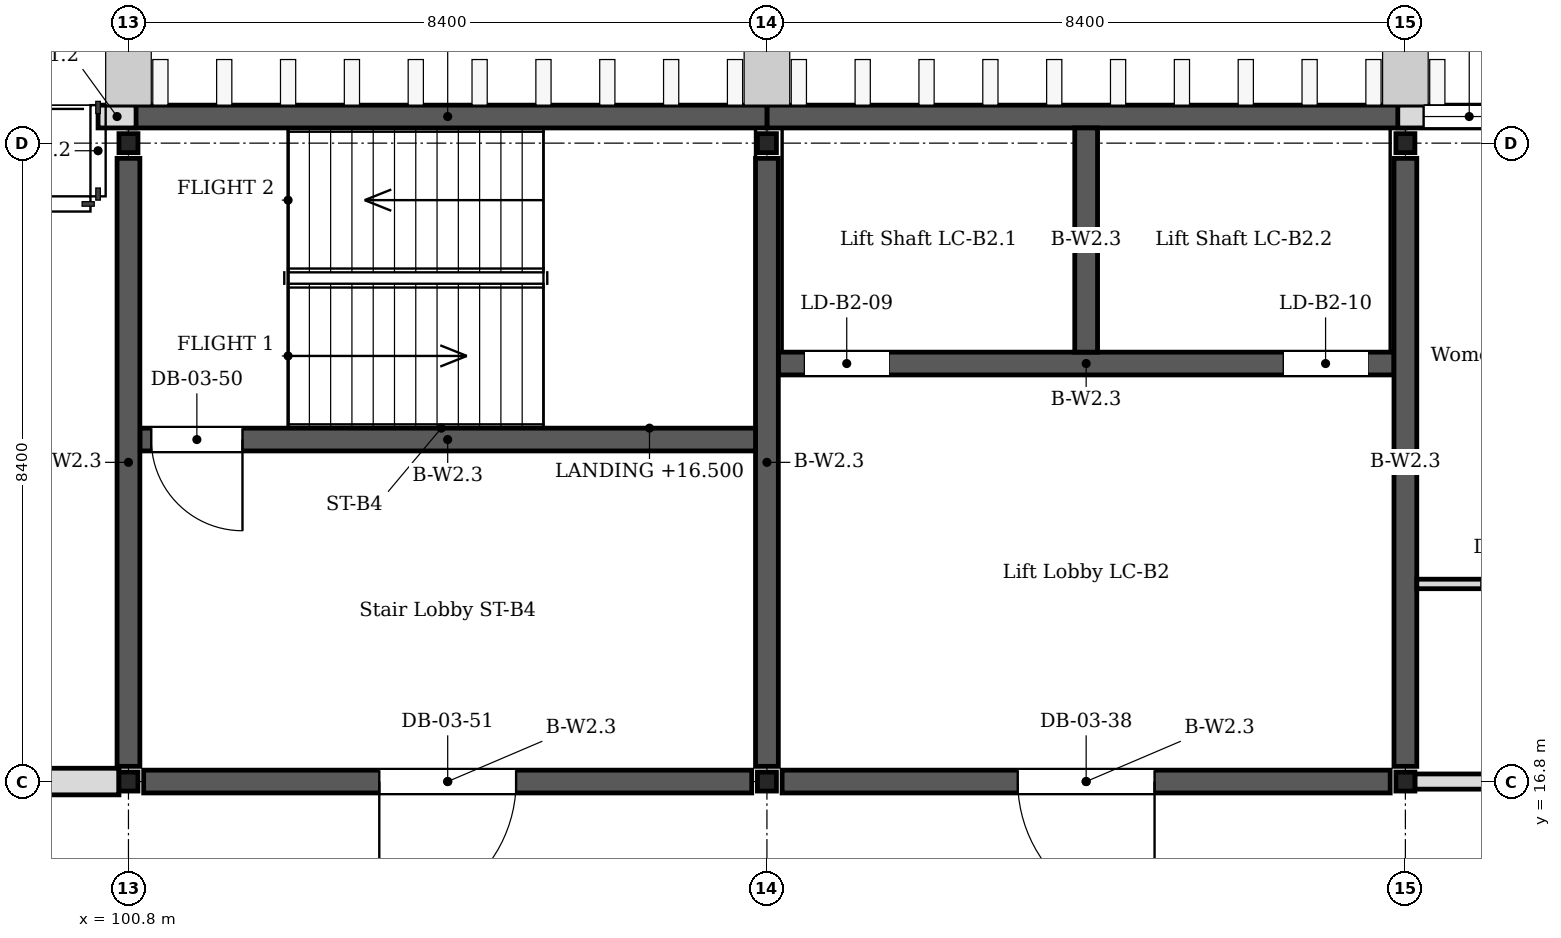
"""IFC4 building model, lengths in metres.
Left out: names, types, materials, properties, quantities, classifications, styles, units other than length and angle.
Written with IfcOpenShell. Run it as: python <this file> out.ifc"""

import sys

from ifc_helpers import new_model, si_unit, direction, frame, frame_2d, origin, origin_2d, place, context, subcontext, project, spatial, rectangle, i_section, extrude, element, fill, save


model = new_model("IFC4")
c1 = context("Model", 3, precision=1e-05, world=origin(), true_north=direction((0.0, 1.0)))
c2 = subcontext(c1, "Body", "Model", "MODEL_VIEW")
j1 = project(units=[si_unit("LENGTHUNIT", "METRE"), si_unit("PLANEANGLEUNIT", "RADIAN")], contexts=[c1])
p1 = place(None, origin())
s1 = spatial("IfcSite", under=j1, at=p1, CompositionType="ELEMENT")
p2 = place(p1, origin())
s2 = spatial("IfcBuilding", under=s1, at=p2, CompositionType="ELEMENT")
p3 = place(p2, frame((0.0, 0.0, 14.4)))
s3 = spatial("IfcBuildingStorey", under=s2, at=p3, CompositionType="ELEMENT", Elevation=14.4)
for number, where, z_axis, x_axis in (
    (1, (100.8, 16.8, 0.0), (0.0, 0.0, 1.0), (1.0, 0.0, 0.0)),
    (2, (100.8, 25.2, 0.0), (0.0, 0.0, 1.0), (1.0, 0.0, 0.0)),
    (3, (109.2, 16.8, 0.0), (0.0, 0.0, 1.0), (1.0, 0.0, 0.0)),
    (4, (109.2, 25.2, 0.0), (0.0, 0.0, 1.0), (1.0, 0.0, 0.0)),
    (5, (117.6, 16.8, 0.0), (0.0, 0.0, 1.0), (1.0, 0.0, 0.0)),
    (6, (117.6, 25.2, 0.0), (0.0, 0.0, 1.0), (1.0, 0.0, 0.0)),
):
    element("IfcColumn", number, at=place(p3, frame(where, z_axis=z_axis, x_axis=x_axis)), inside=s3, PredefinedType="COLUMN", context=c2, shape_type="SweptSolid", body=[
        extrude(i_section(OverallWidth=0.25, OverallDepth=0.25, WebThickness=0.009, FlangeThickness=0.014, FilletRadius=0.013, at=origin_2d()), origin(), (0.0, 0.0, 1.0), 3.95),
    ])
for number, where, z_axis, x_axis in (
    (7, (109.2, 17.0, 0.0), (0.0, 0.0, 1.0), (0.0, 1.0, 0.0)),
    (8, (117.6, 17.0, 0.0), (0.0, 0.0, 1.0), (0.0, 1.0, 0.0)),
):
    element("IfcWall", number, at=place(p3, frame(where, z_axis=z_axis, x_axis=x_axis)), inside=s3, PredefinedType="SHEAR", context=c2, shape_type="SweptSolid", body=[
        extrude(rectangle(XDim=8.0, YDim=0.3, at=frame_2d((4.0, 0.0))), origin(), (0.0, 0.0, 1.0), 3.95),
    ])
p4 = place(p3, frame((109.4, 16.8, 0.0), z_axis=(0.0, 0.0, 1.0), x_axis=(1.0, 0.0, 0.0)))
e9 = element("IfcWall", 9, at=p4, inside=s3, PredefinedType="SHEAR", context=c2, shape_type="SweptSolid", body=[
    extrude(rectangle(XDim=8.0, YDim=0.3, at=frame_2d((4.0, 0.0))), origin(), (0.0, 0.0, 1.0), 3.95),
])
p5 = place(p4, frame((3.1, 0.0, 0.0)))
e10 = element("IfcOpeningElement", 10, at=p5, cuts=e9, PredefinedType="OPENING", context=c2, shape_type="SweptSolid", body=[
    extrude(rectangle(XDim=1.8, YDim=2.1, at=frame_2d((0.9, 1.05))), frame((0.0, 0.16, 0.0), z_axis=(0.0, -1.0, 0.0), x_axis=(1.0, 0.0, 0.0)), (0.0, 0.0, 1.0), 0.32),
])
p6 = place(p3, frame((109.35, 22.3, 0.0), z_axis=(0.0, 0.0, 1.0), x_axis=(1.0, 0.0, 0.0)))
e11 = element("IfcWall", 11, at=p6, inside=s3, PredefinedType="SHEAR", context=c2, shape_type="SweptSolid", body=[
    extrude(rectangle(XDim=8.1, YDim=0.3, at=frame_2d((4.05, 0.0))), origin(), (0.0, 0.0, 1.0), 3.95),
])
p7 = place(p6, frame((0.35, 0.0, 0.0)))
e12 = element("IfcOpeningElement", 12, at=p7, cuts=e11, PredefinedType="OPENING", context=c2, shape_type="SweptSolid", body=[
    extrude(rectangle(XDim=1.1, YDim=2.2, at=frame_2d((0.55, 1.1))), frame((0.0, 0.16, 0.0), z_axis=(0.0, -1.0, 0.0), x_axis=(1.0, 0.0, 0.0)), (0.0, 0.0, 1.0), 0.32),
])
p8 = place(p6, frame((6.65, 0.0, 0.0)))
e13 = element("IfcOpeningElement", 13, at=p8, cuts=e11, PredefinedType="OPENING", context=c2, shape_type="SweptSolid", body=[
    extrude(rectangle(XDim=1.1, YDim=2.2, at=frame_2d((0.55, 1.1))), frame((0.0, 0.16, 0.0), z_axis=(0.0, -1.0, 0.0), x_axis=(1.0, 0.0, 0.0)), (0.0, 0.0, 1.0), 0.32),
])
p9 = place(p3, frame((109.2, 25.55, 0.0), z_axis=(0.0, 0.0, 1.0), x_axis=(1.0, 0.0, 0.0)))
e14 = element("IfcWall", 14, at=p9, inside=s3, PredefinedType="SHEAR", context=c2, shape_type="SweptSolid", body=[
    extrude(rectangle(XDim=8.4, YDim=0.3, at=frame_2d((4.2, 0.0))), origin(), (0.0, 0.0, 1.0), 3.95),
])
p10 = place(p3, frame((113.4, 22.45, 0.0), z_axis=(0.0, 0.0, 1.0), x_axis=(0.0, 1.0, 0.0)))
e15 = element("IfcWall", 15, at=p10, inside=s3, PredefinedType="SHEAR", context=c2, shape_type="SweptSolid", body=[
    extrude(rectangle(XDim=2.95, YDim=0.3, at=frame_2d((1.475, 0.0))), origin(), (0.0, 0.0, 1.0), 3.95),
])
p11 = place(p3, frame((100.8, 17.0, 0.0), z_axis=(0.0, 0.0, 1.0), x_axis=(0.0, 1.0, 0.0)))
e16 = element("IfcWall", 16, at=p11, inside=s3, PredefinedType="SHEAR", context=c2, shape_type="SweptSolid", body=[
    extrude(rectangle(XDim=8.0, YDim=0.3, at=frame_2d((4.0, 0.0))), origin(), (0.0, 0.0, 1.0), 3.95),
])
p12 = place(p3, frame((101.0, 16.8, 0.0), z_axis=(0.0, 0.0, 1.0), x_axis=(1.0, 0.0, 0.0)))
e17 = element("IfcWall", 17, at=p12, inside=s3, PredefinedType="SHEAR", context=c2, shape_type="SweptSolid", body=[
    extrude(rectangle(XDim=8.0, YDim=0.3, at=frame_2d((4.0, 0.0))), origin(), (0.0, 0.0, 1.0), 3.95),
])
p13 = place(p12, frame((3.1, 0.0, 0.0)))
e18 = element("IfcOpeningElement", 18, at=p13, cuts=e17, PredefinedType="OPENING", context=c2, shape_type="SweptSolid", body=[
    extrude(rectangle(XDim=1.8, YDim=2.1, at=frame_2d((0.9, 1.05))), frame((0.0, 0.16, 0.0), z_axis=(0.0, -1.0, 0.0), x_axis=(1.0, 0.0, 0.0)), (0.0, 0.0, 1.0), 0.32),
])
p14 = place(p3, frame((100.95, 21.3, 0.0), z_axis=(0.0, 0.0, 1.0), x_axis=(1.0, 0.0, 0.0)))
e19 = element("IfcWall", 19, at=p14, inside=s3, PredefinedType="SHEAR", context=c2, shape_type="SweptSolid", body=[
    extrude(rectangle(XDim=8.1, YDim=0.3, at=frame_2d((4.05, 0.0))), origin(), (0.0, 0.0, 1.0), 3.95),
])
p15 = place(p14, frame((0.15, 0.0, 0.0)))
e20 = element("IfcOpeningElement", 20, at=p15, cuts=e19, PredefinedType="OPENING", context=c2, shape_type="SweptSolid", body=[
    extrude(rectangle(XDim=1.2, YDim=2.1, at=frame_2d((0.6, 1.05))), frame((0.0, 0.16, 0.0), z_axis=(0.0, -1.0, 0.0), x_axis=(1.0, 0.0, 0.0)), (0.0, 0.0, 1.0), 0.32),
])
p16 = place(p3, frame((100.8, 25.55, 0.0), z_axis=(0.0, 0.0, 1.0), x_axis=(1.0, 0.0, 0.0)))
e21 = element("IfcWall", 21, at=p16, inside=s3, PredefinedType="SHEAR", context=c2, shape_type="SweptSolid", body=[
    extrude(rectangle(XDim=8.4, YDim=0.3, at=frame_2d((4.2, 0.0))), origin(), (0.0, 0.0, 1.0), 3.95),
])
p17 = place(p3, frame((100.4, 25.55, 0.0), z_axis=(0.0, 0.0, 1.0), x_axis=(1.0, 0.0, 0.0)))
e22 = element("IfcWall", 22, at=p17, inside=s3, PredefinedType="SOLIDWALL", context=c2, shape_type="SweptSolid", body=[
    extrude(rectangle(XDim=0.5, YDim=0.3, at=frame_2d((0.25, 0.0))), origin(), (0.0, 0.0, 1.0), 3.95),
])
p18 = place(p3, frame((117.5, 25.55, 0.0), z_axis=(0.0, 0.0, 1.0), x_axis=(1.0, 0.0, 0.0)))
e23 = element("IfcWall", 23, at=p18, inside=s3, PredefinedType="SOLIDWALL", context=c2, shape_type="SweptSolid", body=[
    extrude(rectangle(XDim=8.9, YDim=0.3, at=frame_2d((4.45, 0.0))), origin(), (0.0, 0.0, 1.0), 3.95),
])
p19 = place(p18, frame((0.34, 0.0, 1.5)))
e24 = element("IfcOpeningElement", 24, at=p19, cuts=e23, PredefinedType="OPENING", context=c2, shape_type="SweptSolid", body=[
    extrude(rectangle(XDim=1.2, YDim=1.2, at=frame_2d((0.6, 0.6))), frame((0.0, 0.16, 0.0), z_axis=(0.0, -1.0, 0.0), x_axis=(1.0, 0.0, 0.0)), (0.0, 0.0, 1.0), 0.32),
])
p20 = place(p18, frame((3.7, 0.0, 1.5)))
e25 = element("IfcOpeningElement", 25, at=p20, cuts=e23, PredefinedType="OPENING", context=c2, shape_type="SweptSolid", body=[
    extrude(rectangle(XDim=1.2, YDim=1.2, at=frame_2d((0.6, 0.6))), frame((0.0, 0.16, 0.0), z_axis=(0.0, -1.0, 0.0), x_axis=(1.0, 0.0, 0.0)), (0.0, 0.0, 1.0), 0.32),
])
p21 = place(p18, frame((7.06, 0.0, 1.5)))
e26 = element("IfcOpeningElement", 26, at=p21, cuts=e23, PredefinedType="OPENING", context=c2, shape_type="SweptSolid", body=[
    extrude(rectangle(XDim=1.2, YDim=1.2, at=frame_2d((0.6, 0.6))), frame((0.0, 0.16, 0.0), z_axis=(0.0, -1.0, 0.0), x_axis=(1.0, 0.0, 0.0)), (0.0, 0.0, 1.0), 0.32),
])
p22 = place(p3, frame((92.525, 16.8, 0.0), z_axis=(0.0, 0.0, 1.0), x_axis=(1.0, 0.0, 0.0)))
e27 = element("IfcWall", 27, at=p22, inside=s3, PredefinedType="PARTITIONING", context=c2, shape_type="SweptSolid", body=[
    extrude(rectangle(XDim=8.15, YDim=0.35, at=frame_2d((4.075, 0.0))), origin(), (0.0, 0.0, 1.0), 3.25),
])
p23 = place(p22, frame((3.525, 0.0, 0.0)))
e28 = element("IfcOpeningElement", 28, at=p23, cuts=e27, PredefinedType="OPENING", context=c2, shape_type="SweptSolid", body=[
    extrude(rectangle(XDim=1.1, YDim=2.4, at=frame_2d((0.55, 1.2))), frame((0.0, 0.185, 0.0), z_axis=(0.0, -1.0, 0.0), x_axis=(1.0, 0.0, 0.0)), (0.0, 0.0, 1.0), 0.37),
])
p24 = place(p3, frame((117.725, 16.8, 0.0), z_axis=(0.0, 0.0, 1.0), x_axis=(1.0, 0.0, 0.0)))
e29 = element("IfcWall", 29, at=p24, inside=s3, PredefinedType="PARTITIONING", context=c2, shape_type="SweptSolid", body=[
    extrude(rectangle(XDim=8.15, YDim=0.2, at=frame_2d((4.075, 0.0))), origin(), (0.0, 0.0, 1.0), 3.25),
])
p25 = place(p24, frame((3.175, 0.0, 0.0)))
e30 = element("IfcOpeningElement", 30, at=p25, cuts=e29, PredefinedType="OPENING", context=c2, shape_type="SweptSolid", body=[
    extrude(rectangle(XDim=1.8, YDim=2.1, at=frame_2d((0.9, 1.05))), frame((0.0, 0.11, 0.0), z_axis=(0.0, -1.0, 0.0), x_axis=(1.0, 0.0, 0.0)), (0.0, 0.0, 1.0), 0.22),
])
p26 = place(p3, frame((117.75, 19.4, 0.0), z_axis=(0.0, 0.0, 1.0), x_axis=(1.0, 0.0, 0.0)))
e31 = element("IfcWall", 31, at=p26, inside=s3, PredefinedType="PARTITIONING", context=c2, shape_type="SweptSolid", body=[
    extrude(rectangle(XDim=8.175, YDim=0.125, at=frame_2d((4.087, 0.0))), origin(), (0.0, 0.0, 1.0), 3.25),
])
p27 = place(p26, frame((0.85, 0.0, 0.0)))
e32 = element("IfcOpeningElement", 32, at=p27, cuts=e31, PredefinedType="OPENING", context=c2, shape_type="SweptSolid", body=[
    extrude(rectangle(XDim=1.0, YDim=2.1, at=frame_2d((0.5, 1.05))), frame((0.0, 0.073, 0.0), z_axis=(0.0, -1.0, 0.0), x_axis=(1.0, 0.0, 0.0)), (0.0, 0.0, 1.0), 0.145),
])
p28 = place(p26, frame((3.85, 0.0, 0.0)))
e33 = element("IfcOpeningElement", 33, at=p28, cuts=e31, PredefinedType="OPENING", context=c2, shape_type="SweptSolid", body=[
    extrude(rectangle(XDim=1.0, YDim=2.1, at=frame_2d((0.5, 1.05))), frame((0.0, 0.073, 0.0), z_axis=(0.0, -1.0, 0.0), x_axis=(1.0, 0.0, 0.0)), (0.0, 0.0, 1.0), 0.145),
])
p29 = place(p26, frame((6.55, 0.0, 0.0)))
e34 = element("IfcOpeningElement", 34, at=p29, cuts=e31, PredefinedType="OPENING", context=c2, shape_type="SweptSolid", body=[
    extrude(rectangle(XDim=1.0, YDim=2.1, at=frame_2d((0.5, 1.05))), frame((0.0, 0.073, 0.0), z_axis=(0.0, -1.0, 0.0), x_axis=(1.0, 0.0, 0.0)), (0.0, 0.0, 1.0), 0.145),
])
p30 = place(p19, origin())
e35 = element("IfcWindow", 35, at=p30, inside=s3, PartitioningType="SINGLE_PANEL", PredefinedType="WINDOW", context=c2, shape_type="SweptSolid", body=[
    extrude(rectangle(XDim=1.2, YDim=1.2, at=frame_2d((0.6, 0.6))), frame((0.0, 0.03, 0.0), z_axis=(0.0, -1.0, 0.0), x_axis=(1.0, 0.0, 0.0)), (0.0, 0.0, 1.0), 0.06),
])
fill(e24, e35)
p31 = place(p5, origin())
e36 = element("IfcDoor", 36, at=p31, inside=s3, OperationType="DOUBLE_DOOR_SINGLE_SWING", PredefinedType="DOOR", context=c2, shape_type="SweptSolid", body=[
    extrude(rectangle(XDim=1.8, YDim=2.1, at=frame_2d((0.9, 1.05))), frame((0.0, 0.025, 0.0), z_axis=(0.0, -1.0, 0.0), x_axis=(1.0, 0.0, 0.0)), (0.0, 0.0, 1.0), 0.05),
])
fill(e10, e36)
p32 = place(p7, origin())
e37 = element("IfcDoor", 37, at=p32, inside=s3, OperationType="SLIDING_TO_LEFT", PredefinedType="DOOR", context=c2, shape_type="SweptSolid", body=[
    extrude(rectangle(XDim=1.1, YDim=2.2, at=frame_2d((0.55, 1.1))), frame((0.0, 0.025, 0.0), z_axis=(0.0, -1.0, 0.0), x_axis=(1.0, 0.0, 0.0)), (0.0, 0.0, 1.0), 0.05),
])
fill(e12, e37)
p33 = place(p8, origin())
e38 = element("IfcDoor", 38, at=p33, inside=s3, OperationType="SLIDING_TO_LEFT", PredefinedType="DOOR", context=c2, shape_type="SweptSolid", body=[
    extrude(rectangle(XDim=1.1, YDim=2.2, at=frame_2d((0.55, 1.1))), frame((0.0, 0.025, 0.0), z_axis=(0.0, -1.0, 0.0), x_axis=(1.0, 0.0, 0.0)), (0.0, 0.0, 1.0), 0.05),
])
fill(e13, e38)
p34 = place(p15, origin())
e39 = element("IfcDoor", 39, at=p34, inside=s3, OperationType="SINGLE_SWING_LEFT", PredefinedType="DOOR", context=c2, shape_type="SweptSolid", body=[
    extrude(rectangle(XDim=1.2, YDim=2.1, at=frame_2d((0.6, 1.05))), frame((0.0, 0.025, 0.0), z_axis=(0.0, -1.0, 0.0), x_axis=(1.0, 0.0, 0.0)), (0.0, 0.0, 1.0), 0.05),
])
fill(e20, e39)
p35 = place(p13, origin())
e40 = element("IfcDoor", 40, at=p35, inside=s3, OperationType="DOUBLE_DOOR_SINGLE_SWING", PredefinedType="DOOR", context=c2, shape_type="SweptSolid", body=[
    extrude(rectangle(XDim=1.8, YDim=2.1, at=frame_2d((0.9, 1.05))), frame((0.0, 0.025, 0.0), z_axis=(0.0, -1.0, 0.0), x_axis=(1.0, 0.0, 0.0)), (0.0, 0.0, 1.0), 0.05),
])
fill(e18, e40)
save(model, sys.argv[1])
